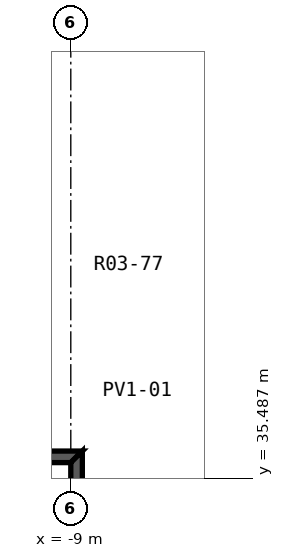
"""IFC4 building model, lengths in metres.
Left out: names, types, materials, properties, quantities, classifications, styles, units other than length and angle.
Written with IfcOpenShell. Run it as: python <this file> out.ifc"""

import sys

from ifc_helpers import new_model, si_unit, direction, frame, origin, place, context, subcontext, project, spatial, polyline, outline, extrude, element, save


model = new_model("IFC4")
c1 = context("Model", 3, precision=1e-05, world=origin(), true_north=direction((0.0, 1.0)))
c2 = subcontext(c1, "Body", "Model", "MODEL_VIEW")
j1 = project(units=[si_unit("LENGTHUNIT", "METRE"), si_unit("PLANEANGLEUNIT", "RADIAN")], contexts=[c1])
p1 = place(None, origin())
s1 = spatial("IfcSite", under=j1, at=p1, CompositionType="ELEMENT")
p2 = place(p1, origin())
s2 = spatial("IfcBuilding", under=s1, at=p2, CompositionType="ELEMENT")
p3 = place(p2, origin())
s3 = spatial("IfcBuildingStorey", under=s2, at=p3, CompositionType="ELEMENT", Elevation=0.0)
p4 = place(p3, frame((0.0, 0.0, -1.0)))
e1 = element("IfcWall", 1, at=p4, inside=s3, PredefinedType="SOLIDWALL", context=c2, shape_type="SweptSolid", body=[
    extrude(outline(polyline([(-24.0, 36.0), (-9.0, 36.0), (-8.62, 36.38), (-23.62, 36.38), (-24.0, 36.0)])), origin(), (0.0, 0.0, 1.0), 0.85),
])
p5 = place(p3, frame((0.0, 0.0, -1.0)))
e2 = element("IfcWall", 2, at=p5, inside=s3, PredefinedType="SOLIDWALL", context=c2, shape_type="SweptSolid", body=[
    extrude(outline(polyline([(-9.0, 36.0), (-9.0, 35.0), (-8.62, 35.38), (-8.62, 36.38), (-9.0, 36.0)])), origin(), (0.0, 0.0, 1.0), 0.85),
])
save(model, sys.argv[1])
